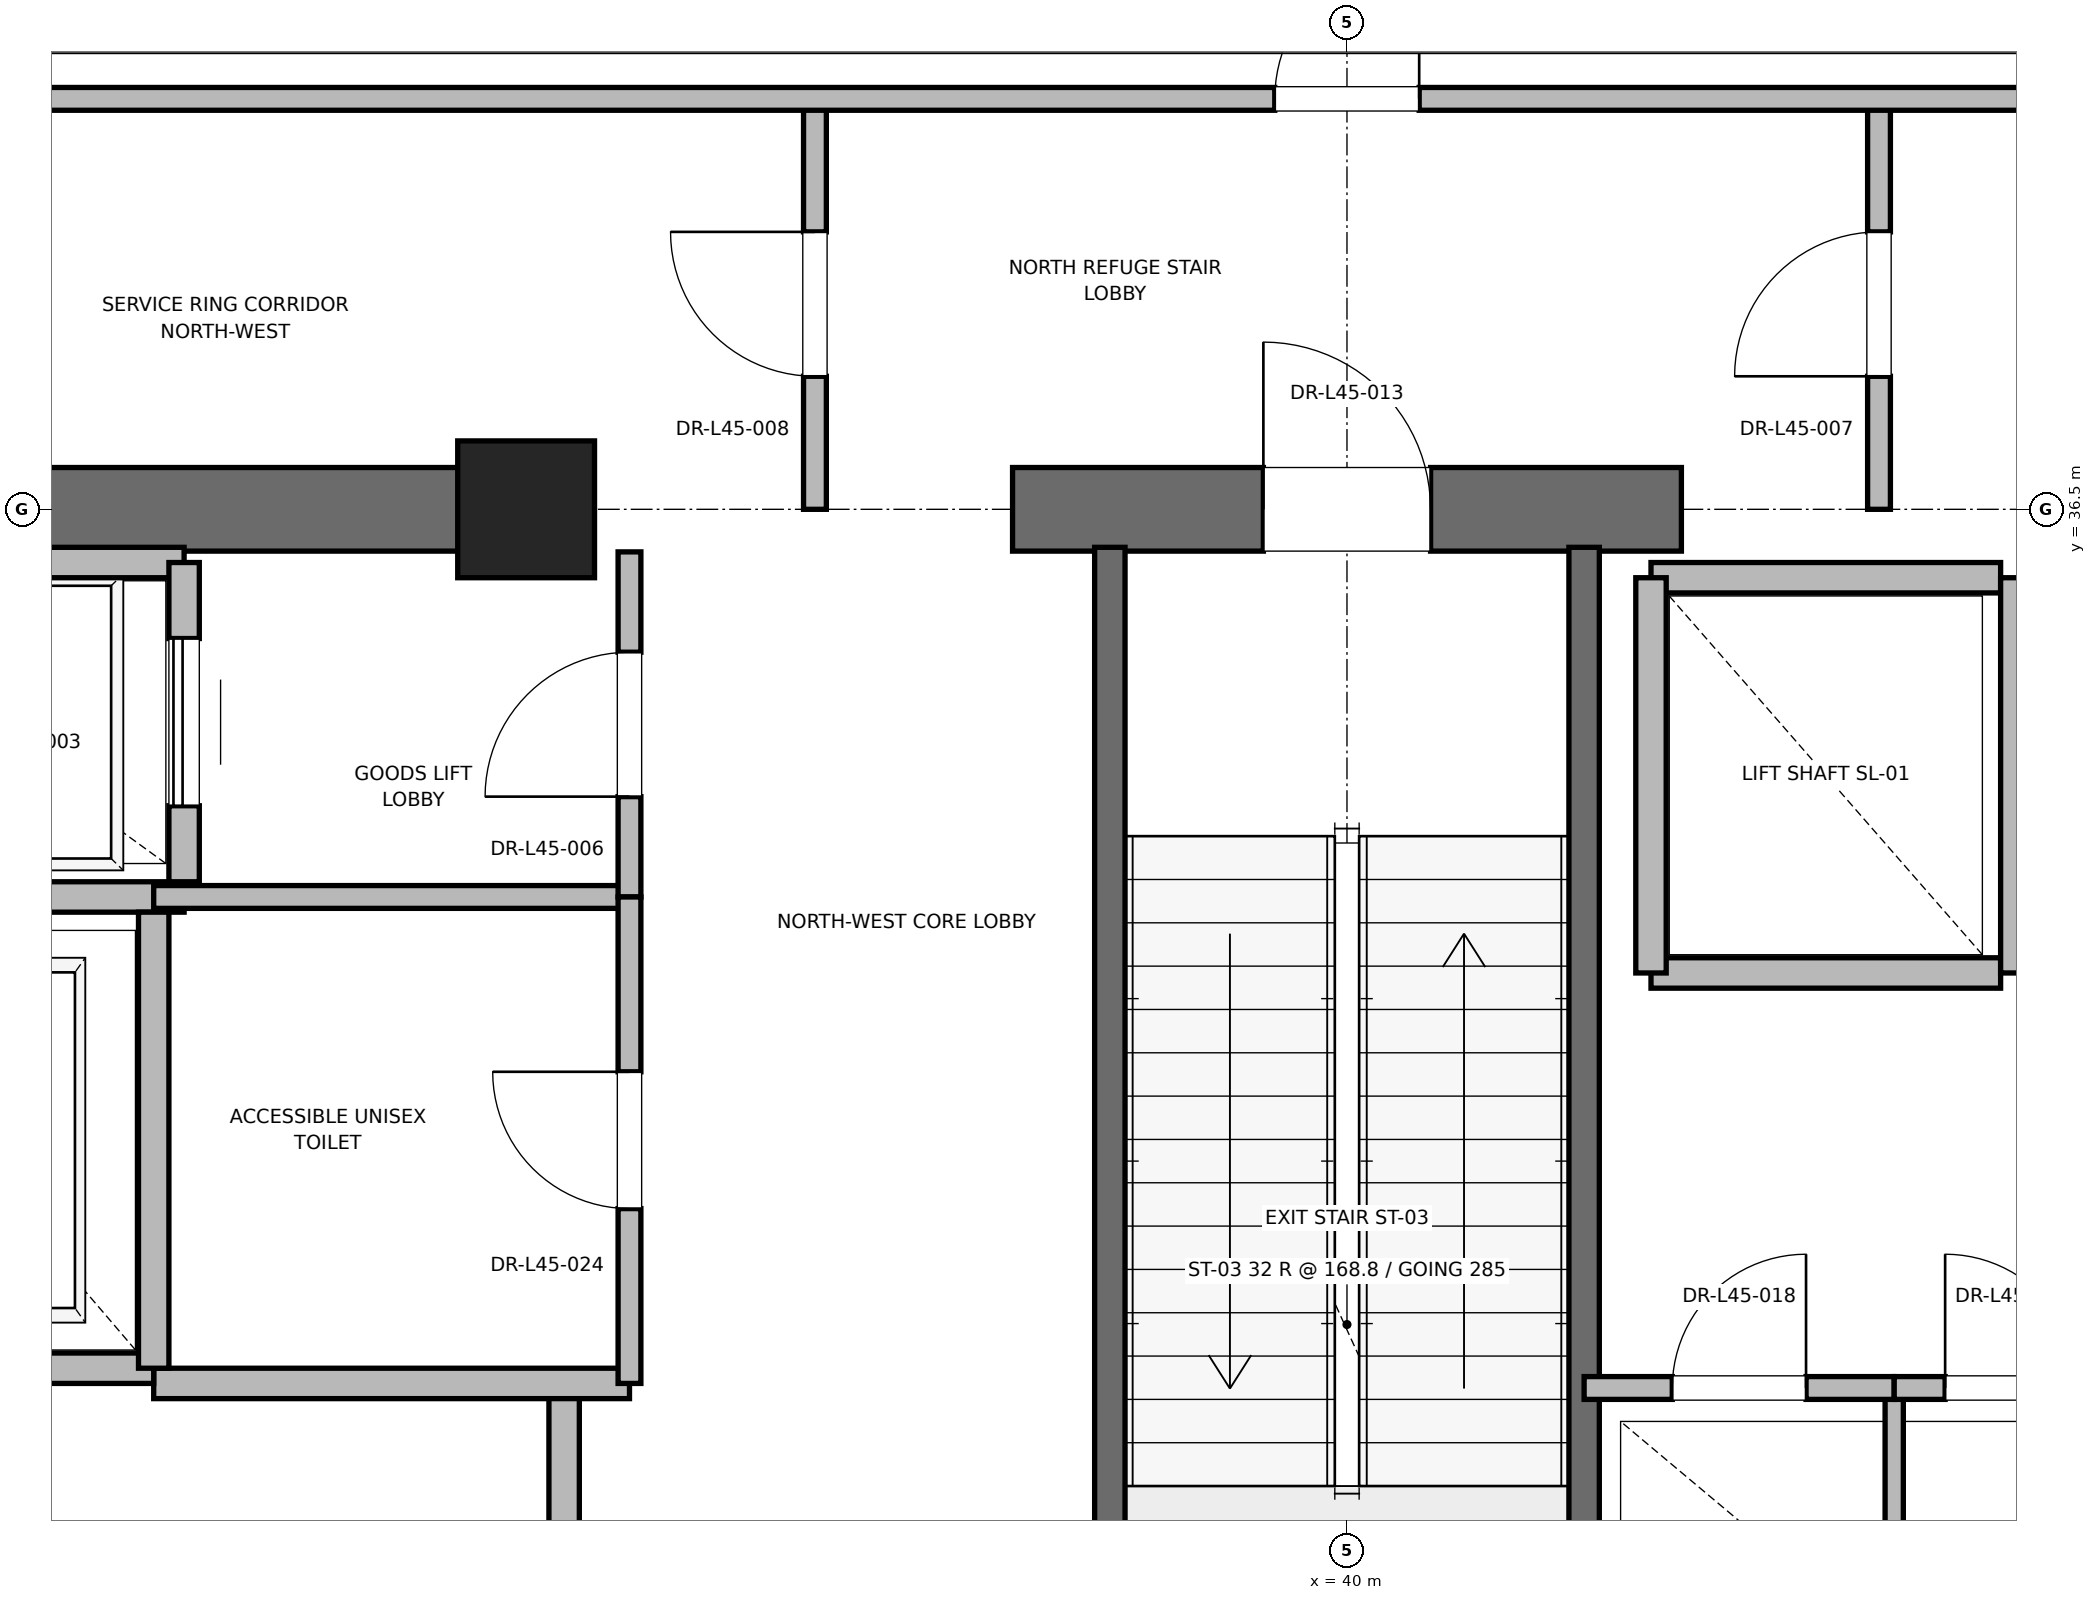
"""IFC4 building model, lengths in metres.
Left out: names, types, materials, properties, quantities, classifications, styles, units other than length and angle.
Written with IfcOpenShell. Run it as: python <this file> out.ifc"""

import sys

from ifc_helpers import new_model, si_unit, direction, frame, frame_2d, origin, origin_2d, place, context, subcontext, project, spatial, rectangle, extrude, element, fill, save


model = new_model("IFC4")
c1 = context("Model", 3, precision=1e-05, world=origin(), true_north=direction((0.0, 1.0)))
c2 = subcontext(c1, "Body", "Model", "MODEL_VIEW")
j1 = project(units=[si_unit("LENGTHUNIT", "METRE"), si_unit("PLANEANGLEUNIT", "RADIAN")], contexts=[c1])
p1 = place(None, origin())
s1 = spatial("IfcSite", under=j1, at=p1, CompositionType="ELEMENT")
p2 = place(p1, origin())
s2 = spatial("IfcBuilding", under=s1, at=p2, CompositionType="ELEMENT")
p3 = place(p2, frame((0.0, 0.0, 194.8)))
s3 = spatial("IfcBuildingStorey", under=s2, at=p3, CompositionType="ELEMENT", Elevation=194.8)
p4 = place(p3, frame((34.6, 36.5, 0.0), z_axis=(0.0, 0.0, 1.0), x_axis=(1.0, 0.0, 0.0)))
e1 = element("IfcColumn", 1, at=p4, inside=s3, PredefinedType="PILASTER", context=c2, shape_type="SweptSolid", body=[
    extrude(rectangle(XDim=0.9, YDim=0.9, at=origin_2d()), origin(), (0.0, 0.0, 1.0), 5.4),
])
p5 = place(p3, frame((29.0, 36.5, 0.0), z_axis=(0.0, 0.0, 1.0), x_axis=(1.0, 0.0, 0.0)))
e2 = element("IfcWall", 2, at=p5, inside=s3, PredefinedType="SHEAR", context=c2, shape_type="SweptSolid", body=[
    extrude(rectangle(XDim=5.8, YDim=0.55, at=frame_2d((2.9, 0.0))), origin(), (0.0, 0.0, 1.0), 5.1),
])
p6 = place(p3, frame((37.8, 36.5, 0.0), z_axis=(0.0, 0.0, 1.0), x_axis=(1.0, 0.0, 0.0)))
e3 = element("IfcWall", 3, at=p6, inside=s3, PredefinedType="SHEAR", context=c2, shape_type="SweptSolid", body=[
    extrude(rectangle(XDim=4.4, YDim=0.55, at=frame_2d((2.2, 0.0))), origin(), (0.0, 0.0, 1.0), 5.1),
])
p7 = place(p6, frame((1.65, 0.0, 0.0)))
e4 = element("IfcOpeningElement", 4, at=p7, cuts=e3, PredefinedType="OPENING", context=c2, shape_type="SweptSolid", body=[
    extrude(rectangle(XDim=1.1, YDim=2.15, at=frame_2d((0.55, 1.075))), frame((0.0, 0.275, 0.0), z_axis=(0.0, -1.0, 0.0), x_axis=(1.0, 0.0, 0.0)), (0.0, 0.0, 1.0), 0.55),
])
p8 = place(p3, frame((38.44, 27.38, 0.0), z_axis=(0.0, 0.0, 1.0), x_axis=(0.0, 1.0, 0.0)))
e5 = element("IfcWall", 5, at=p8, inside=s3, PredefinedType="SOLIDWALL", context=c2, shape_type="SweptSolid", body=[
    extrude(rectangle(XDim=8.87, YDim=0.2, at=frame_2d((4.435, 0.0))), origin(), (0.0, 0.0, 1.0), 5.1),
])
p9 = place(p3, frame((41.56, 27.68, 0.0), z_axis=(0.0, 0.0, 1.0), x_axis=(0.0, 1.0, 0.0)))
e6 = element("IfcWall", 6, at=p9, inside=s3, PredefinedType="SOLIDWALL", context=c2, shape_type="SweptSolid", body=[
    extrude(rectangle(XDim=8.57, YDim=0.2, at=frame_2d((4.285, 0.0))), origin(), (0.0, 0.0, 1.0), 5.1),
])
p10 = place(p3, frame((34.85, 27.38, 0.0), z_axis=(0.0, 0.0, 1.0), x_axis=(0.0, 1.0, 0.0)))
e7 = element("IfcWall", 7, at=p10, inside=s3, PredefinedType="PARTITIONING", context=c2, shape_type="SweptSolid", body=[
    extrude(rectangle(XDim=3.37, YDim=0.2, at=frame_2d((1.685, 0.0))), origin(), (0.0, 0.0, 1.0), 5.1),
])
p11 = place(p10, frame((1.11, 0.0, 0.0)))
e8 = element("IfcOpeningElement", 8, at=p11, cuts=e7, PredefinedType="OPENING", context=c2, shape_type="SweptSolid", body=[
    extrude(rectangle(XDim=1.15, YDim=2.2, at=frame_2d((0.575, 1.1))), frame((0.0, 0.1, 0.0), z_axis=(0.0, -1.0, 0.0), x_axis=(1.0, 0.0, 0.0)), (0.0, 0.0, 1.0), 0.2),
])
p12 = place(p3, frame((32.15, 30.75, 0.0), z_axis=(0.0, 0.0, 1.0), x_axis=(1.0, 0.0, 0.0)))
e9 = element("IfcWall", 9, at=p12, inside=s3, PredefinedType="PARTITIONING", context=c2, shape_type="SweptSolid", body=[
    extrude(rectangle(XDim=3.13, YDim=0.2, at=frame_2d((1.565, 0.0))), origin(), (0.0, 0.0, 1.0), 5.1),
])
p13 = place(p3, frame((29.55, 30.85, 0.0), z_axis=(0.0, 0.0, 1.0), x_axis=(1.0, 0.0, 0.0)))
e10 = element("IfcWall", 10, at=p13, inside=s3, PredefinedType="SOLIDWALL", context=c2, shape_type="SweptSolid", body=[
    extrude(rectangle(XDim=2.6, YDim=0.2, at=frame_2d((1.3, 0.0))), origin(), (0.0, 0.0, 1.0), 4.08),
])
p14 = place(p13, frame((0.75, 0.0, 0.0)))
e11 = element("IfcOpeningElement", 11, at=p14, cuts=e10, PredefinedType="OPENING", context=c2, shape_type="SweptSolid", body=[
    extrude(rectangle(XDim=1.1, YDim=2.2, at=frame_2d((0.55, 1.1))), frame((0.0, 0.1, 0.0), z_axis=(0.0, -1.0, 0.0), x_axis=(1.0, 0.0, 0.0)), (0.0, 0.0, 1.0), 0.2),
])
p15 = place(p3, frame((29.55, 33.95, 0.0), z_axis=(0.0, 0.0, 1.0), x_axis=(1.0, 0.0, 0.0)))
e12 = element("IfcWall", 12, at=p15, inside=s3, PredefinedType="SOLIDWALL", context=c2, shape_type="SweptSolid", body=[
    extrude(rectangle(XDim=2.8, YDim=0.2, at=frame_2d((1.4, 0.0))), origin(), (0.0, 0.0, 1.0), 5.1),
])
p16 = place(p3, frame((32.15, 30.85, 0.0), z_axis=(0.0, 0.0, 1.0), x_axis=(0.0, 1.0, 0.0)))
e13 = element("IfcWall", 13, at=p16, inside=s3, PredefinedType="SOLIDWALL", context=c2, shape_type="SweptSolid", body=[
    extrude(rectangle(XDim=3.0, YDim=0.2, at=frame_2d((1.5, 0.0))), origin(), (0.0, 0.0, 1.0), 5.1),
])
p17 = place(p3, frame((32.35, 36.15, 0.0), z_axis=(0.0, 0.0, 1.0), x_axis=(-1.0, 0.0, 0.0)))
e14 = element("IfcWall", 14, at=p17, inside=s3, PredefinedType="SOLIDWALL", context=c2, shape_type="SweptSolid", body=[
    extrude(rectangle(XDim=2.8, YDim=0.2, at=frame_2d((1.4, 0.0))), origin(), (0.0, 0.0, 1.0), 4.153),
])
p18 = place(p3, frame((32.35, 34.05, 0.0), z_axis=(0.0, 0.0, 1.0), x_axis=(0.0, 1.0, 0.0)))
e15 = element("IfcWall", 15, at=p18, inside=s3, PredefinedType="SOLIDWALL", context=c2, shape_type="SweptSolid", body=[
    extrude(rectangle(XDim=2.1, YDim=0.2, at=frame_2d((1.05, 0.0))), origin(), (0.0, 0.0, 1.0), 5.1),
])
p19 = place(p18, frame((0.5, 0.0, 0.0)))
e16 = element("IfcOpeningElement", 16, at=p19, cuts=e15, PredefinedType="OPENING", context=c2, shape_type="SweptSolid", body=[
    extrude(rectangle(XDim=1.1, YDim=2.2, at=frame_2d((0.55, 1.1))), frame((0.0, 0.1, 0.0), z_axis=(0.0, -1.0, 0.0), x_axis=(1.0, 0.0, 0.0)), (0.0, 0.0, 1.0), 0.2),
])
p20 = place(p3, frame((42.0, 33.45, 0.0), z_axis=(0.0, 0.0, 1.0), x_axis=(1.0, 0.0, 0.0)))
e17 = element("IfcWall", 17, at=p20, inside=s3, PredefinedType="SOLIDWALL", context=c2, shape_type="SweptSolid", body=[
    extrude(rectangle(XDim=2.3, YDim=0.2, at=frame_2d((1.15, 0.0))), origin(), (0.0, 0.0, 1.0), 5.1),
])
p21 = place(p3, frame((44.3, 36.05, 0.0), z_axis=(0.0, 0.0, 1.0), x_axis=(-1.0, 0.0, 0.0)))
e18 = element("IfcWall", 18, at=p21, inside=s3, PredefinedType="SOLIDWALL", context=c2, shape_type="SweptSolid", body=[
    extrude(rectangle(XDim=2.3, YDim=0.2, at=frame_2d((1.15, 0.0))), origin(), (0.0, 0.0, 1.0), 4.08),
])
for number, where, z_axis, x_axis in (
    (19, (42.0, 36.05, 0.0), (0.0, 0.0, 1.0), (0.0, -1.0, 0.0)),
    (20, (44.4, 33.45, 0.0), (0.0, 0.0, 1.0), (0.0, 1.0, 0.0)),
):
    element("IfcWall", number, at=place(p3, frame(where, z_axis=z_axis, x_axis=x_axis)), inside=s3, PredefinedType="SOLIDWALL", context=c2, shape_type="SweptSolid", body=[
        extrude(rectangle(XDim=2.6, YDim=0.2, at=frame_2d((1.3, 0.0))), origin(), (0.0, 0.0, 1.0), 4.08),
    ])
p22 = place(p3, frame((32.15, 33.95, 0.0), z_axis=(0.0, 0.0, 1.0), x_axis=(1.0, 0.0, 0.0)))
e21 = element("IfcWall", 21, at=p22, inside=s3, PredefinedType="PARTITIONING", context=c2, shape_type="SweptSolid", body=[
    extrude(rectangle(XDim=3.13, YDim=0.15, at=frame_2d((1.565, 0.0))), origin(), (0.0, 0.0, 1.0), 2.85),
])
p23 = place(p3, frame((35.28, 33.95, 0.0), z_axis=(0.0, 0.0, 1.0), x_axis=(0.0, 1.0, 0.0)))
e22 = element("IfcWall", 22, at=p23, inside=s3, PredefinedType="PARTITIONING", context=c2, shape_type="SweptSolid", body=[
    extrude(rectangle(XDim=2.27, YDim=0.15, at=frame_2d((1.135, 0.0))), origin(), (0.0, 0.0, 1.0), 2.85),
])
p24 = place(p23, frame((0.66, 0.0, 0.0)))
e23 = element("IfcOpeningElement", 23, at=p24, cuts=e22, PredefinedType="OPENING", context=c2, shape_type="SweptSolid", body=[
    extrude(rectangle(XDim=0.95, YDim=2.15, at=frame_2d((0.475, 1.075))), frame((0.0, 0.075, 0.0), z_axis=(0.0, -1.0, 0.0), x_axis=(1.0, 0.0, 0.0)), (0.0, 0.0, 1.0), 0.15),
])
p25 = place(p3, frame((35.28, 30.75, 0.0), z_axis=(0.0, 0.0, 1.0), x_axis=(0.0, 1.0, 0.0)))
e24 = element("IfcWall", 24, at=p25, inside=s3, PredefinedType="PARTITIONING", context=c2, shape_type="SweptSolid", body=[
    extrude(rectangle(XDim=3.2, YDim=0.15, at=frame_2d((1.6, 0.0))), origin(), (0.0, 0.0, 1.0), 2.85),
])
p26 = place(p25, frame((1.15, 0.0, 0.0)))
e25 = element("IfcOpeningElement", 25, at=p26, cuts=e24, PredefinedType="OPENING", context=c2, shape_type="SweptSolid", body=[
    extrude(rectangle(XDim=0.9, YDim=2.1, at=frame_2d((0.45, 1.05))), frame((0.0, 0.075, 0.0), z_axis=(0.0, -1.0, 0.0), x_axis=(1.0, 0.0, 0.0)), (0.0, 0.0, 1.0), 0.15),
])
p27 = place(p3, frame((43.6, 27.68, 0.0), z_axis=(0.0, 0.0, 1.0), x_axis=(0.0, 1.0, 0.0)))
e26 = element("IfcWall", 26, at=p27, inside=s3, PredefinedType="PARTITIONING", context=c2, shape_type="SweptSolid", body=[
    extrude(rectangle(XDim=3.04, YDim=0.12, at=frame_2d((1.52, 0.0))), origin(), (0.0, 0.0, 1.0), 2.85),
])
p28 = place(p3, frame((41.56, 30.72, 0.0), z_axis=(0.0, 0.0, 1.0), x_axis=(1.0, 0.0, 0.0)))
e27 = element("IfcWall", 27, at=p28, inside=s3, PredefinedType="PARTITIONING", context=c2, shape_type="SweptSolid", body=[
    extrude(rectangle(XDim=2.04, YDim=0.15, at=frame_2d((1.02, 0.0))), origin(), (0.0, 0.0, 1.0), 2.85),
])
p29 = place(p28, frame((0.58, 0.0, 0.0)))
e28 = element("IfcOpeningElement", 28, at=p29, cuts=e27, PredefinedType="OPENING", context=c2, shape_type="SweptSolid", body=[
    extrude(rectangle(XDim=0.88, YDim=2.1, at=frame_2d((0.44, 1.05))), frame((0.0, 0.075, 0.0), z_axis=(0.0, -1.0, 0.0), x_axis=(1.0, 0.0, 0.0)), (0.0, 0.0, 1.0), 0.15),
])
p30 = place(p3, frame((43.6, 30.72, 0.0), z_axis=(0.0, 0.0, 1.0), x_axis=(1.0, 0.0, 0.0)))
e29 = element("IfcWall", 29, at=p30, inside=s3, PredefinedType="PARTITIONING", context=c2, shape_type="SweptSolid", body=[
    extrude(rectangle(XDim=1.55, YDim=0.15, at=frame_2d((0.775, 0.0))), origin(), (0.0, 0.0, 1.0), 2.85),
])
p31 = place(p30, frame((0.335, 0.0, 0.0)))
e30 = element("IfcOpeningElement", 30, at=p31, cuts=e29, PredefinedType="OPENING", context=c2, shape_type="SweptSolid", body=[
    extrude(rectangle(XDim=0.88, YDim=2.1, at=frame_2d((0.44, 1.05))), frame((0.0, 0.075, 0.0), z_axis=(0.0, -1.0, 0.0), x_axis=(1.0, 0.0, 0.0)), (0.0, 0.0, 1.0), 0.15),
])
p32 = place(p3, frame((36.5, 36.5, 0.0), z_axis=(0.0, 0.0, 1.0), x_axis=(0.0, 1.0, 0.0)))
e31 = element("IfcWall", 31, at=p32, inside=s3, PredefinedType="PARTITIONING", context=c2, shape_type="SweptSolid", body=[
    extrude(rectangle(XDim=2.7, YDim=0.15, at=frame_2d((1.35, 0.0))), origin(), (0.0, 0.0, 1.0), 2.85),
])
p33 = place(p32, frame((0.875, 0.0, 0.0)))
e32 = element("IfcOpeningElement", 32, at=p33, cuts=e31, PredefinedType="OPENING", context=c2, shape_type="SweptSolid", body=[
    extrude(rectangle(XDim=0.95, YDim=2.15, at=frame_2d((0.475, 1.075))), frame((0.0, 0.075, 0.0), z_axis=(0.0, -1.0, 0.0), x_axis=(1.0, 0.0, 0.0)), (0.0, 0.0, 1.0), 0.15),
])
p34 = place(p3, frame((43.5, 36.5, 0.0), z_axis=(0.0, 0.0, 1.0), x_axis=(0.0, 1.0, 0.0)))
e33 = element("IfcWall", 33, at=p34, inside=s3, PredefinedType="PARTITIONING", context=c2, shape_type="SweptSolid", body=[
    extrude(rectangle(XDim=2.7, YDim=0.15, at=frame_2d((1.35, 0.0))), origin(), (0.0, 0.0, 1.0), 2.85),
])
p35 = place(p34, frame((0.875, 0.0, 0.0)))
e34 = element("IfcOpeningElement", 34, at=p35, cuts=e33, PredefinedType="OPENING", context=c2, shape_type="SweptSolid", body=[
    extrude(rectangle(XDim=0.95, YDim=2.15, at=frame_2d((0.475, 1.075))), frame((0.0, 0.075, 0.0), z_axis=(0.0, -1.0, 0.0), x_axis=(1.0, 0.0, 0.0)), (0.0, 0.0, 1.0), 0.15),
])
p36 = place(p3, frame((29.25, 39.2, 0.0), z_axis=(0.0, 0.0, 1.0), x_axis=(1.0, 0.0, 0.0)))
e35 = element("IfcWall", 35, at=p36, inside=s3, PredefinedType="PARTITIONING", context=c2, shape_type="SweptSolid", body=[
    extrude(rectangle(XDim=21.5, YDim=0.15, at=frame_2d((10.75, 0.0))), origin(), (0.0, 0.0, 1.0), 2.85),
])
p37 = place(p36, frame((10.275, 0.0, 0.0)))
e36 = element("IfcOpeningElement", 36, at=p37, cuts=e35, PredefinedType="OPENING", context=c2, shape_type="SweptSolid", body=[
    extrude(rectangle(XDim=0.95, YDim=2.15, at=frame_2d((0.475, 1.075))), frame((0.0, 0.075, 0.0), z_axis=(0.0, -1.0, 0.0), x_axis=(1.0, 0.0, 0.0)), (0.0, 0.0, 1.0), 0.15),
])
p38 = place(p7, origin())
e37 = element("IfcDoor", 37, at=p38, inside=s3, OperationType="SINGLE_SWING_LEFT", PredefinedType="DOOR", context=c2, shape_type="SweptSolid", body=[
    extrude(rectangle(XDim=1.1, YDim=2.15, at=frame_2d((0.55, 1.075))), frame((0.0, 0.025, 0.0), z_axis=(0.0, -1.0, 0.0), x_axis=(1.0, 0.0, 0.0)), (0.0, 0.0, 1.0), 0.05),
])
fill(e4, e37)
p39 = place(p19, origin())
e38 = element("IfcDoor", 38, at=p39, inside=s3, OperationType="SLIDING_TO_RIGHT", PredefinedType="DOOR", context=c2, shape_type="SweptSolid", body=[
    extrude(rectangle(XDim=1.1, YDim=2.2, at=frame_2d((0.55, 1.1))), frame((0.0, 0.025, 0.0), z_axis=(0.0, -1.0, 0.0), x_axis=(1.0, 0.0, 0.0)), (0.0, 0.0, 1.0), 0.05),
])
fill(e16, e38)
p40 = place(p24, origin())
e39 = element("IfcDoor", 39, at=p40, inside=s3, OperationType="SINGLE_SWING_LEFT", PredefinedType="DOOR", context=c2, shape_type="SweptSolid", body=[
    extrude(rectangle(XDim=0.95, YDim=2.15, at=frame_2d((0.475, 1.075))), frame((0.0, 0.025, 0.0), z_axis=(0.0, -1.0, 0.0), x_axis=(1.0, 0.0, 0.0)), (0.0, 0.0, 1.0), 0.05),
])
fill(e23, e39)
p41 = place(p26, origin())
e40 = element("IfcDoor", 40, at=p41, inside=s3, OperationType="SINGLE_SWING_RIGHT", PredefinedType="DOOR", context=c2, shape_type="SweptSolid", body=[
    extrude(rectangle(XDim=0.9, YDim=2.1, at=frame_2d((0.45, 1.05))), frame((0.0, 0.025, 0.0), z_axis=(0.0, -1.0, 0.0), x_axis=(1.0, 0.0, 0.0)), (0.0, 0.0, 1.0), 0.05),
])
fill(e25, e40)
p42 = place(p29, origin())
e41 = element("IfcDoor", 41, at=p42, inside=s3, OperationType="SINGLE_SWING_RIGHT", PredefinedType="DOOR", context=c2, shape_type="SweptSolid", body=[
    extrude(rectangle(XDim=0.88, YDim=2.1, at=frame_2d((0.44, 1.05))), frame((0.0, 0.025, 0.0), z_axis=(0.0, -1.0, 0.0), x_axis=(1.0, 0.0, 0.0)), (0.0, 0.0, 1.0), 0.05),
])
fill(e28, e41)
p43 = place(p31, origin())
e42 = element("IfcDoor", 42, at=p43, inside=s3, OperationType="SINGLE_SWING_LEFT", PredefinedType="DOOR", context=c2, shape_type="SweptSolid", body=[
    extrude(rectangle(XDim=0.88, YDim=2.1, at=frame_2d((0.44, 1.05))), frame((0.0, 0.025, 0.0), z_axis=(0.0, -1.0, 0.0), x_axis=(1.0, 0.0, 0.0)), (0.0, 0.0, 1.0), 0.05),
])
fill(e30, e42)
p44 = place(p33, origin())
e43 = element("IfcDoor", 43, at=p44, inside=s3, OperationType="SINGLE_SWING_RIGHT", PredefinedType="DOOR", context=c2, shape_type="SweptSolid", body=[
    extrude(rectangle(XDim=0.95, YDim=2.15, at=frame_2d((0.475, 1.075))), frame((0.0, 0.025, 0.0), z_axis=(0.0, -1.0, 0.0), x_axis=(1.0, 0.0, 0.0)), (0.0, 0.0, 1.0), 0.05),
])
fill(e32, e43)
p45 = place(p35, origin())
e44 = element("IfcDoor", 44, at=p45, inside=s3, OperationType="SINGLE_SWING_LEFT", PredefinedType="DOOR", context=c2, shape_type="SweptSolid", body=[
    extrude(rectangle(XDim=0.95, YDim=2.15, at=frame_2d((0.475, 1.075))), frame((0.0, 0.025, 0.0), z_axis=(0.0, -1.0, 0.0), x_axis=(1.0, 0.0, 0.0)), (0.0, 0.0, 1.0), 0.05),
])
fill(e34, e44)
p46 = place(p37, origin())
e45 = element("IfcDoor", 45, at=p46, inside=s3, OperationType="SINGLE_SWING_RIGHT", PredefinedType="DOOR", context=c2, shape_type="SweptSolid", body=[
    extrude(rectangle(XDim=0.95, YDim=2.15, at=frame_2d((0.475, 1.075))), frame((0.0, 0.025, 0.0), z_axis=(0.0, -1.0, 0.0), x_axis=(1.0, 0.0, 0.0)), (0.0, 0.0, 1.0), 0.05),
])
fill(e36, e45)
save(model, sys.argv[1])
